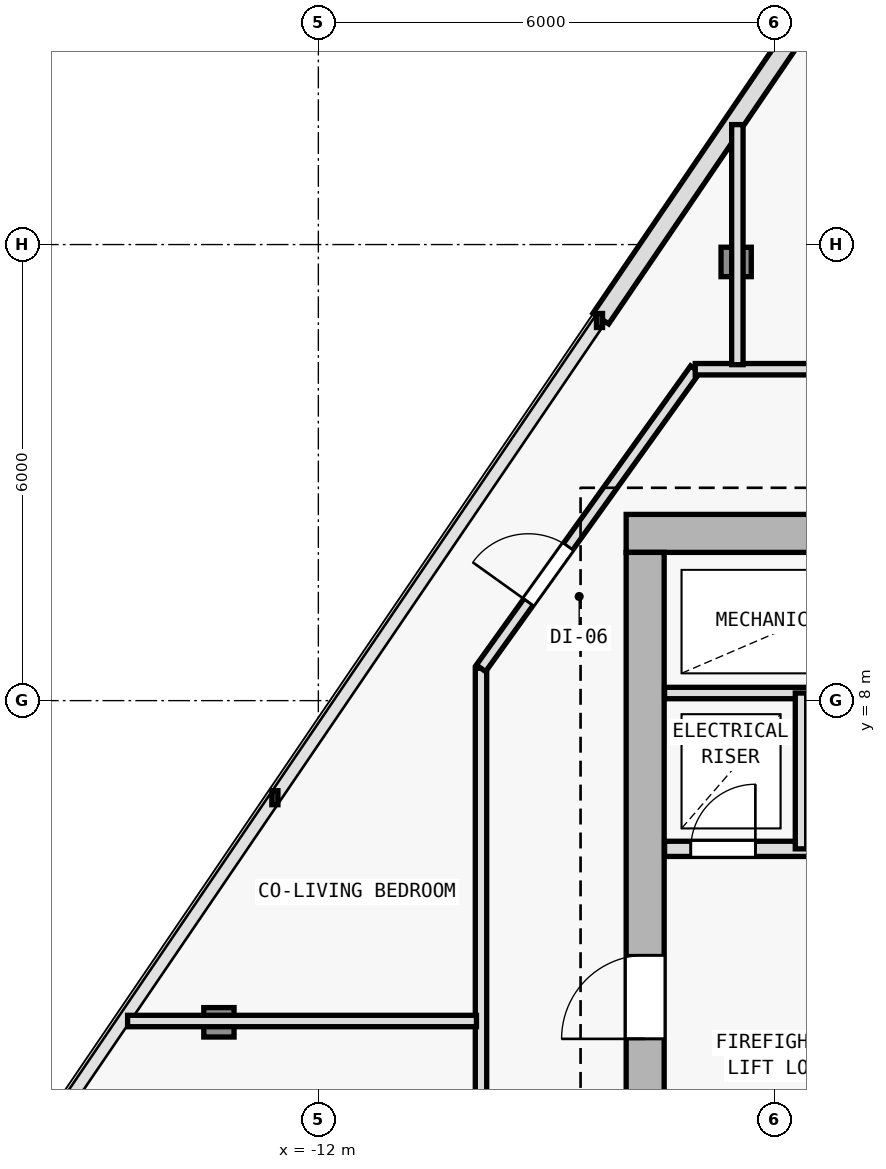
"""IFC4 building model, lengths in metres.
Left out: names, types, materials, properties, quantities, classifications, styles, units other than length and angle.
Written with IfcOpenShell. Run it as: python <this file> out.ifc"""

import sys

from ifc_helpers import new_model, si_unit, direction, frame, frame_2d, origin, origin_2d, place, context, subcontext, project, spatial, rectangle, i_section, extrude, element, fill, save


model = new_model("IFC4")
c1 = context("Model", 3, precision=1e-05, world=origin(), true_north=direction((0.0, 1.0)))
c2 = subcontext(c1, "Body", "Model", "MODEL_VIEW")
j1 = project(units=[si_unit("LENGTHUNIT", "METRE"), si_unit("PLANEANGLEUNIT", "RADIAN")], contexts=[c1])
p1 = place(None, origin())
s1 = spatial("IfcSite", under=j1, at=p1, CompositionType="ELEMENT")
p2 = place(p1, origin())
s2 = spatial("IfcBuilding", under=s1, at=p2, CompositionType="ELEMENT")
p3 = place(p2, frame((0.0, 0.0, 201.9)))
s3 = spatial("IfcBuildingStorey", under=s2, at=p3, CompositionType="ELEMENT", Elevation=201.9)
p4 = place(p3, frame((-7.7, 10.2, 0.0), z_axis=(0.0, 0.0, 1.0), x_axis=(1.0, 0.0, 0.0)))
e1 = element("IfcColumn", 1, at=p4, inside=s3, PredefinedType="COLUMN", context=c2, shape_type="SweptSolid", body=[
    extrude(i_section(OverallWidth=0.398, OverallDepth=0.387, WebThickness=0.013, FlangeThickness=0.022, FilletRadius=0.015, at=origin_2d()), origin(), (0.0, 0.0, 1.0), 3.6),
])
p5 = place(p3, frame((-6.503, 13.771, 0.006), z_axis=(0.008843163607, -0.002516900411, 0.999957730942), x_axis=(0.273743828055, 0.961802639112, 0.0)))
e2 = element("IfcColumn", 2, at=p5, inside=s3, PredefinedType="COLUMN", context=c2, shape_type="SweptSolid", body=[
    extrude(i_section(OverallWidth=0.398, OverallDepth=0.387, WebThickness=0.013, FlangeThickness=0.022, FilletRadius=0.015, at=origin_2d()), origin(), (0.0, 0.0, 1.0), 3.589),
])
p6 = place(p3, frame((-13.308, 3.768, 0.006), z_axis=(0.017071567417, 0.009521989794, 0.999808928394), x_axis=(-0.487119351792, 0.873335409284, 0.0)))
e3 = element("IfcColumn", 3, at=p6, inside=s3, PredefinedType="COLUMN", context=c2, shape_type="SweptSolid", body=[
    extrude(i_section(OverallWidth=0.398, OverallDepth=0.387, WebThickness=0.013, FlangeThickness=0.022, FilletRadius=0.015, at=origin_2d()), origin(), (0.0, 0.0, 1.0), 3.59),
])
p7 = place(p3, frame((-8.284, 13.026, 0.0), z_axis=(0.0, 0.0, 1.0), x_axis=(0.562468945091, 0.826818411629, 0.0)))
e4 = element("IfcWall", 4, at=p7, inside=s3, PredefinedType="SOLIDWALL", context=c2, shape_type="SweptSolid", body=[
    extrude(rectangle(XDim=10.714, YDim=0.25, at=frame_2d((5.357, 0.0))), origin(), (0.0, 0.0, 1.0), 3.35),
])
p8 = place(p7, frame((4.457, 0.0, 0.62)))
e5 = element("IfcOpeningElement", 5, at=p8, cuts=e4, PredefinedType="OPENING", context=c2, shape_type="SweptSolid", body=[
    extrude(rectangle(XDim=1.8, YDim=2.1, at=frame_2d((0.9, 1.05))), frame((0.0, 0.135, 0.0), z_axis=(0.0, -1.0, 0.0), x_axis=(1.0, 0.0, 0.0)), (0.0, 0.0, 1.0), 0.27),
])
p9 = place(p3, frame((7.95, 10.2, 0.0), z_axis=(0.0, 0.0, 1.0), x_axis=(-1.0, 0.0, 0.0)))
e6 = element("IfcWall", 6, at=p9, inside=s3, PredefinedType="SHEAR", context=c2, shape_type="SweptSolid", body=[
    extrude(rectangle(XDim=15.9, YDim=0.5, at=frame_2d((7.95, 0.0))), origin(), (0.0, 0.0, 1.0), 3.35),
])
p10 = place(p9, frame((4.4, 0.0, 0.0)))
e7 = element("IfcOpeningElement", 7, at=p10, cuts=e6, PredefinedType="OPENING", context=c2, shape_type="SweptSolid", body=[
    extrude(rectangle(XDim=1.1, YDim=2.15, at=frame_2d((0.55, 1.075))), frame((0.0, 0.26, 0.0), z_axis=(0.0, -1.0, 0.0), x_axis=(1.0, 0.0, 0.0)), (0.0, 0.0, 1.0), 0.52),
])
p11 = place(p3, frame((-7.7, -9.15, 0.0), z_axis=(0.0, 0.0, 1.0), x_axis=(0.0, 1.0, 0.0)))
e8 = element("IfcWall", 8, at=p11, inside=s3, PredefinedType="SHEAR", context=c2, shape_type="SweptSolid", body=[
    extrude(rectangle(XDim=19.1, YDim=0.5, at=frame_2d((9.55, 0.0))), origin(), (0.0, 0.0, 1.0), 3.35),
])
p12 = place(p11, frame((12.7, 0.0, 0.0)))
e9 = element("IfcOpeningElement", 9, at=p12, cuts=e8, PredefinedType="OPENING", context=c2, shape_type="SweptSolid", body=[
    extrude(rectangle(XDim=1.1, YDim=2.15, at=frame_2d((0.55, 1.075))), frame((0.0, 0.26, 0.0), z_axis=(0.0, -1.0, 0.0), x_axis=(1.0, 0.0, 0.0)), (0.0, 0.0, 1.0), 0.52),
])
p13 = place(p3, frame((-7.445, 6.05, 0.0), z_axis=(0.0, 0.0, 1.0), x_axis=(1.0, 0.0, 0.0)))
e10 = element("IfcWall", 10, at=p13, inside=s3, PredefinedType="SOLIDWALL", context=c2, shape_type="SweptSolid", body=[
    extrude(rectangle(XDim=3.595, YDim=0.2, at=frame_2d((1.797, 0.0))), origin(), (0.0, 0.0, 1.0), 3.35),
])
p14 = place(p13, frame((0.345, 0.0, 0.0)))
e11 = element("IfcOpeningElement", 11, at=p14, cuts=e10, PredefinedType="OPENING", context=c2, shape_type="SweptSolid", body=[
    extrude(rectangle(XDim=0.85, YDim=2.1, at=frame_2d((0.425, 1.05))), frame((0.0, 0.11, 0.0), z_axis=(0.0, -1.0, 0.0), x_axis=(1.0, 0.0, 0.0)), (0.0, 0.0, 1.0), 0.22),
])
p15 = place(p13, frame((2.145, 0.0, 0.0)))
e12 = element("IfcOpeningElement", 12, at=p15, cuts=e10, PredefinedType="OPENING", context=c2, shape_type="SweptSolid", body=[
    extrude(rectangle(XDim=0.85, YDim=2.1, at=frame_2d((0.425, 1.05))), frame((0.0, 0.11, 0.0), z_axis=(0.0, -1.0, 0.0), x_axis=(1.0, 0.0, 0.0)), (0.0, 0.0, 1.0), 0.22),
])
p16 = place(p3, frame((-7.445, 8.1, 0.0), z_axis=(0.0, 0.0, 1.0), x_axis=(1.0, 0.0, 0.0)))
e13 = element("IfcWall", 13, at=p16, inside=s3, PredefinedType="PARTITIONING", context=c2, shape_type="SweptSolid", body=[
    extrude(rectangle(XDim=3.595, YDim=0.15, at=frame_2d((1.797, 0.0))), origin(), (0.0, 0.0, 1.0), 3.35),
])
p17 = place(p3, frame((-5.65, 6.05, 0.0), z_axis=(0.0, 0.0, 1.0), x_axis=(0.0, 1.0, 0.0)))
e14 = element("IfcWall", 14, at=p17, inside=s3, PredefinedType="PARTITIONING", context=c2, shape_type="SweptSolid", body=[
    extrude(rectangle(XDim=2.05, YDim=0.15, at=frame_2d((1.025, 0.0))), origin(), (0.0, 0.0, 1.0), 3.35),
])
p18 = place(p3, frame((-9.86, -11.56, 0.0), z_axis=(0.0, 0.0, 1.0), x_axis=(0.0, 1.0, 0.0)))
e15 = element("IfcWall", 15, at=p18, inside=s3, PredefinedType="PARTITIONING", context=c2, shape_type="SweptSolid", body=[
    extrude(rectangle(XDim=19.986, YDim=0.15, at=frame_2d((9.993, 0.0))), origin(), (0.0, 0.0, 1.0), 2.775),
])
p19 = place(p18, frame((11.041, 0.0, 0.0)))
e16 = element("IfcOpeningElement", 16, at=p19, cuts=e15, PredefinedType="OPENING", context=c2, shape_type="SweptSolid", body=[
    extrude(rectangle(XDim=0.9, YDim=2.1, at=frame_2d((0.45, 1.05))), frame((0.0, 0.085, 0.0), z_axis=(0.0, -1.0, 0.0), x_axis=(1.0, 0.0, 0.0)), (0.0, 0.0, 1.0), 0.17),
])
p20 = place(p18, frame((8.766, 0.0, 0.0)))
e17 = element("IfcOpeningElement", 17, at=p20, cuts=e15, PredefinedType="OPENING", context=c2, shape_type="SweptSolid", body=[
    extrude(rectangle(XDim=0.9, YDim=2.1, at=frame_2d((0.45, 1.05))), frame((0.0, 0.085, 0.0), z_axis=(0.0, -1.0, 0.0), x_axis=(1.0, 0.0, 0.0)), (0.0, 0.0, 1.0), 0.17),
])
p21 = place(p18, frame((6.227, 0.0, 0.0)))
e18 = element("IfcOpeningElement", 18, at=p21, cuts=e15, PredefinedType="OPENING", context=c2, shape_type="SweptSolid", body=[
    extrude(rectangle(XDim=0.9, YDim=2.1, at=frame_2d((0.45, 1.05))), frame((0.0, 0.085, 0.0), z_axis=(0.0, -1.0, 0.0), x_axis=(1.0, 0.0, 0.0)), (0.0, 0.0, 1.0), 0.17),
])
p22 = place(p18, frame((2.321, 0.0, 0.0)))
e19 = element("IfcOpeningElement", 19, at=p22, cuts=e15, PredefinedType="OPENING", context=c2, shape_type="SweptSolid", body=[
    extrude(rectangle(XDim=0.9, YDim=2.1, at=frame_2d((0.45, 1.05))), frame((0.0, 0.085, 0.0), z_axis=(0.0, -1.0, 0.0), x_axis=(1.0, 0.0, 0.0)), (0.0, 0.0, 1.0), 0.17),
])
p23 = place(p18, frame((13.492, 0.0, 0.0)))
e20 = element("IfcOpeningElement", 20, at=p23, cuts=e15, PredefinedType="OPENING", context=c2, shape_type="SweptSolid", body=[
    extrude(rectangle(XDim=0.9, YDim=2.1, at=frame_2d((0.45, 1.05))), frame((0.0, 0.085, 0.0), z_axis=(0.0, -1.0, 0.0), x_axis=(1.0, 0.0, 0.0)), (0.0, 0.0, 1.0), 0.17),
])
p24 = place(p3, frame((-9.86, 8.426, 0.0), z_axis=(0.0, 0.0, 1.0), x_axis=(0.582449511476, 0.812866881218, 0.0)))
e21 = element("IfcWall", 21, at=p24, inside=s3, PredefinedType="PARTITIONING", context=c2, shape_type="SweptSolid", body=[
    extrude(rectangle(XDim=4.84, YDim=0.15, at=frame_2d((2.42, 0.0))), origin(), (0.0, 0.0, 1.0), 2.935),
])
p25 = place(p24, frame((1.07, 0.0, 0.0)))
e22 = element("IfcOpeningElement", 22, at=p25, cuts=e21, PredefinedType="OPENING", context=c2, shape_type="SweptSolid", body=[
    extrude(rectangle(XDim=0.9, YDim=2.1, at=frame_2d((0.45, 1.05))), frame((0.0, 0.085, 0.0), z_axis=(0.0, -1.0, 0.0), x_axis=(1.0, 0.0, 0.0)), (0.0, 0.0, 1.0), 0.17),
])
p26 = place(p3, frame((-7.041, 12.36, 0.0), z_axis=(0.0, 0.0, 1.0), x_axis=(1.0, 0.0, 0.0)))
e23 = element("IfcWall", 23, at=p26, inside=s3, PredefinedType="PARTITIONING", context=c2, shape_type="SweptSolid", body=[
    extrude(rectangle(XDim=14.064, YDim=0.15, at=frame_2d((7.032, 0.0))), origin(), (0.0, 0.0, 1.0), 3.005),
])
p27 = place(p26, frame((6.77, 0.0, 0.0)))
e24 = element("IfcOpeningElement", 24, at=p27, cuts=e23, PredefinedType="OPENING", context=c2, shape_type="SweptSolid", body=[
    extrude(rectangle(XDim=0.9, YDim=2.1, at=frame_2d((0.45, 1.05))), frame((0.0, 0.085, 0.0), z_axis=(0.0, -1.0, 0.0), x_axis=(1.0, 0.0, 0.0)), (0.0, 0.0, 1.0), 0.17),
])
p28 = place(p3, frame((-6.487, 12.42, 0.0), z_axis=(0.0, 0.0, 1.0), x_axis=(0.0, 1.0, 0.0)))
e25 = element("IfcWall", 25, at=p28, inside=s3, PredefinedType="PARTITIONING", context=c2, shape_type="SweptSolid", body=[
    extrude(rectangle(XDim=3.158, YDim=0.15, at=frame_2d((1.579, 0.0))), origin(), (0.0, 0.0, 1.0), 2.935),
])
p29 = place(p3, frame((-9.92, 3.785, 0.0), z_axis=(0.0, 0.0, 1.0), x_axis=(-1.0, 0.0, 0.0)))
e26 = element("IfcWall", 26, at=p29, inside=s3, PredefinedType="PARTITIONING", context=c2, shape_type="SweptSolid", body=[
    extrude(rectangle(XDim=4.59, YDim=0.15, at=frame_2d((2.295, 0.0))), origin(), (0.0, 0.0, 1.0), 2.935),
])
p30 = place(p12, origin())
e27 = element("IfcDoor", 27, at=p30, inside=s3, OperationType="SINGLE_SWING_LEFT", PredefinedType="DOOR", context=c2, shape_type="SweptSolid", body=[
    extrude(rectangle(XDim=1.1, YDim=2.15, at=frame_2d((0.55, 1.075))), frame((0.0, 0.025, 0.0), z_axis=(0.0, -1.0, 0.0), x_axis=(1.0, 0.0, 0.0)), (0.0, 0.0, 1.0), 0.05),
])
fill(e9, e27)
p31 = place(p14, origin())
e28 = element("IfcDoor", 28, at=p31, inside=s3, OperationType="SINGLE_SWING_RIGHT", PredefinedType="DOOR", context=c2, shape_type="SweptSolid", body=[
    extrude(rectangle(XDim=0.85, YDim=2.1, at=frame_2d((0.425, 1.05))), frame((0.0, 0.025, 0.0), z_axis=(0.0, -1.0, 0.0), x_axis=(1.0, 0.0, 0.0)), (0.0, 0.0, 1.0), 0.05),
])
fill(e11, e28)
p32 = place(p25, origin())
e29 = element("IfcDoor", 29, at=p32, inside=s3, OperationType="SINGLE_SWING_LEFT", PredefinedType="DOOR", context=c2, shape_type="SweptSolid", body=[
    extrude(rectangle(XDim=0.9, YDim=2.1, at=frame_2d((0.45, 1.05))), frame((0.0, 0.025, 0.0), z_axis=(0.0, -1.0, 0.0), x_axis=(1.0, 0.0, 0.0)), (0.0, 0.0, 1.0), 0.05),
])
fill(e22, e29)
save(model, sys.argv[1])
